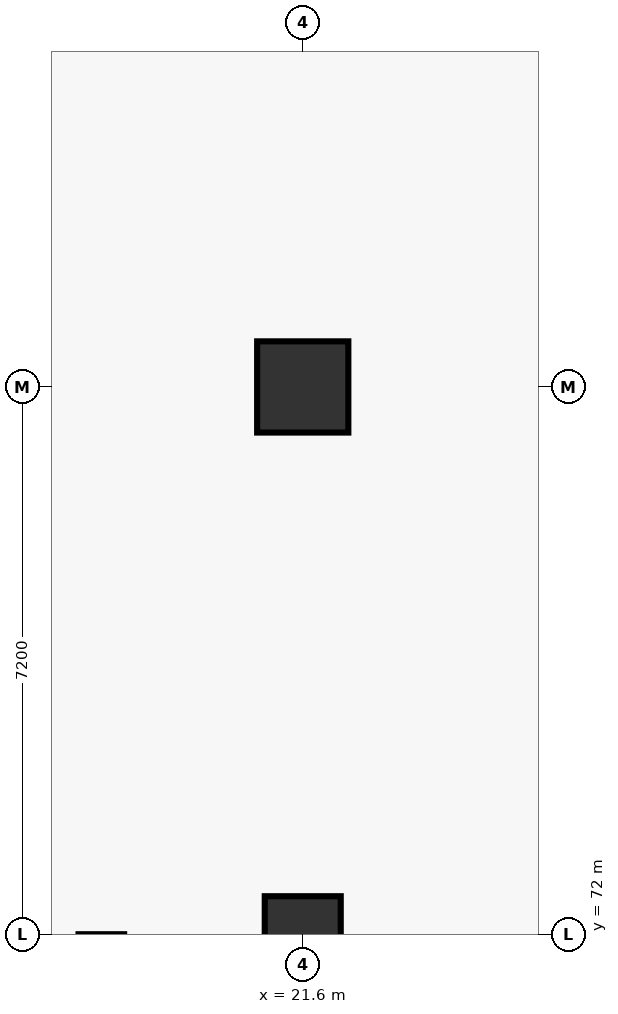
"""IFC4 building model, lengths in metres.
Left out: names, types, materials, properties, quantities, classifications, styles, units other than length and angle.
Written with IfcOpenShell. Run it as: python <this file> out.ifc"""

import sys

from ifc_helpers import new_model, si_unit, direction, frame, origin, origin_2d, place, context, subcontext, project, spatial, rectangle, circle, extrude, element, save


model = new_model("IFC4")
c1 = context("Model", 3, precision=1e-05, world=origin(), true_north=direction((0.0, 1.0)))
c2 = subcontext(c1, "Body", "Model", "MODEL_VIEW")
j1 = project(units=[si_unit("LENGTHUNIT", "METRE"), si_unit("PLANEANGLEUNIT", "RADIAN")], contexts=[c1])
p1 = place(None, origin())
s1 = spatial("IfcSite", under=j1, at=p1, CompositionType="ELEMENT")
p2 = place(p1, origin())
s2 = spatial("IfcBuilding", under=s1, at=p2, CompositionType="ELEMENT")
p3 = place(p2, frame((0.0, 0.0, -5.4)))
s3 = spatial("IfcBuildingStorey", under=s2, at=p3, CompositionType="ELEMENT", Elevation=-5.4)
p4 = place(p3, frame((21.6, 72.0, 0.0), z_axis=(0.0, 0.0, 1.0), x_axis=(1.0, 0.0, 0.0)))
e1 = element("IfcColumn", 1, at=p4, inside=s3, PredefinedType="COLUMN", context=c2, shape_type="SweptSolid", body=[
    extrude(rectangle(XDim=1.0, YDim=1.0, at=origin_2d()), origin(), (0.0, 0.0, 1.0), 5.4),
])
p5 = place(p3, frame((21.6, 79.2, 0.0), z_axis=(0.0, 0.0, 1.0), x_axis=(1.0, 0.0, 0.0)))
e2 = element("IfcColumn", 2, at=p5, inside=s3, PredefinedType="COLUMN", context=c2, shape_type="SweptSolid", body=[
    extrude(circle(Radius=0.6, at=origin_2d()), origin(), (0.0, 0.0, 1.0), 5.4),
])
save(model, sys.argv[1])
